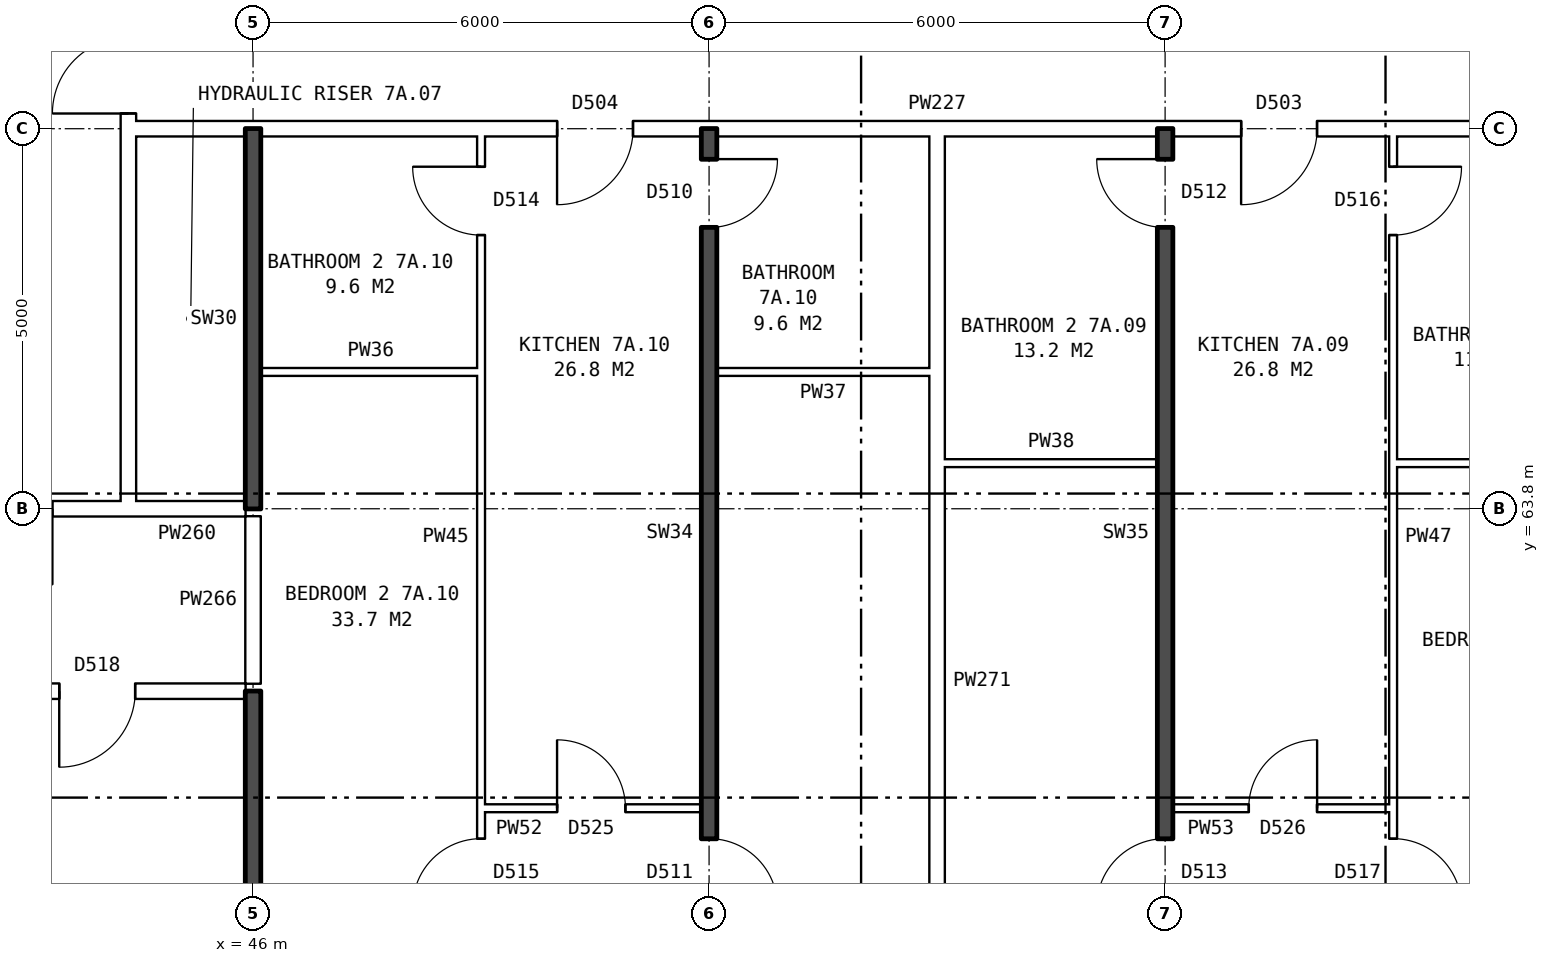
"""IFC4 building model, lengths in metres.
Left out: names, types, materials, properties, quantities, classifications, styles, units other than length and angle.
Written with IfcOpenShell. Run it as: python <this file> out.ifc"""

import sys

from ifc_helpers import new_model, si_unit, direction, frame, frame_2d, origin, place, context, subcontext, project, spatial, rectangle, extrude, element, fill, save


model = new_model("IFC4")
c1 = context("Model", 3, precision=1e-05, world=origin(), true_north=direction((0.0, 1.0)))
c2 = subcontext(c1, "Body", "Model", "MODEL_VIEW")
j1 = project(units=[si_unit("LENGTHUNIT", "METRE"), si_unit("PLANEANGLEUNIT", "RADIAN")], contexts=[c1])
p1 = place(None, origin())
s1 = spatial("IfcSite", under=j1, at=p1, CompositionType="ELEMENT")
p2 = place(p1, origin())
s2 = spatial("IfcBuilding", under=s1, at=p2, CompositionType="ELEMENT")
p3 = place(p2, frame((0.0, 0.0, 28.8)))
s3 = spatial("IfcBuildingStorey", under=s2, at=p3, CompositionType="ELEMENT", Elevation=28.8)
p4 = place(p3, frame((44.36, 63.9, 0.0), z_axis=(0.0, 0.0, 1.0), x_axis=(0.0, 1.0, 0.0)))
e1 = element("IfcWall", 1, at=p4, inside=s3, PredefinedType="PARTITIONING", context=c2, shape_type="SweptSolid", body=[
    extrude(rectangle(XDim=12.2, YDim=0.2, at=frame_2d((6.1, 0.0))), origin(), (0.0, 0.0, 1.0), 2.85),
])
p5 = place(p4, frame((5.1, 0.0, 0.0)))
e2 = element("IfcOpeningElement", 2, at=p5, cuts=e1, PredefinedType="OPENING", context=c2, shape_type="SweptSolid", body=[
    extrude(rectangle(XDim=2.0, YDim=2.1, at=frame_2d((1.0, 1.05))), frame((0.0, 0.11, 0.0), z_axis=(0.0, -1.0, 0.0), x_axis=(1.0, 0.0, 0.0)), (0.0, 0.0, 1.0), 0.22),
])
p6 = place(p3, frame((49.0, 59.86, 0.0), z_axis=(0.0, 0.0, 1.0), x_axis=(1.0, 0.0, 0.0)))
e3 = element("IfcWall", 3, at=p6, inside=s3, PredefinedType="PARTITIONING", context=c2, shape_type="SweptSolid", body=[
    extrude(rectangle(XDim=2.9, YDim=0.1, at=frame_2d((1.45, 0.0))), origin(), (0.0, 0.0, 1.0), 2.85),
])
p7 = place(p6, frame((1.0, 0.0, 0.0)))
e4 = element("IfcOpeningElement", 4, at=p7, cuts=e3, PredefinedType="OPENING", context=c2, shape_type="SweptSolid", body=[
    extrude(rectangle(XDim=0.9, YDim=2.1, at=frame_2d((0.45, 1.05))), frame((0.0, 0.06, 0.0), z_axis=(0.0, -1.0, 0.0), x_axis=(1.0, 0.0, 0.0)), (0.0, 0.0, 1.0), 0.12),
])
p8 = place(p3, frame((58.1, 59.86, 0.0), z_axis=(0.0, 0.0, 1.0), x_axis=(1.0, 0.0, 0.0)))
e5 = element("IfcWall", 5, at=p8, inside=s3, PredefinedType="PARTITIONING", context=c2, shape_type="SweptSolid", body=[
    extrude(rectangle(XDim=2.9, YDim=0.1, at=frame_2d((1.45, 0.0))), origin(), (0.0, 0.0, 1.0), 2.85),
])
p9 = place(p8, frame((1.0, 0.0, 0.0)))
e6 = element("IfcOpeningElement", 6, at=p9, cuts=e5, PredefinedType="OPENING", context=c2, shape_type="SweptSolid", body=[
    extrude(rectangle(XDim=0.9, YDim=2.1, at=frame_2d((0.45, 1.05))), frame((0.0, 0.06, 0.0), z_axis=(0.0, -1.0, 0.0), x_axis=(1.0, 0.0, 0.0)), (0.0, 0.0, 1.0), 0.12),
])
p10 = place(p3, frame((20.11, 61.4, 0.0), z_axis=(0.0, 0.0, 1.0), x_axis=(1.0, 0.0, 0.0)))
e7 = element("IfcWall", 7, at=p10, inside=s3, PredefinedType="PARTITIONING", context=c2, shape_type="SweptSolid", body=[
    extrude(rectangle(XDim=25.79, YDim=0.2, at=frame_2d((12.895, 0.0))), origin(), (0.0, 0.0, 1.0), 2.85),
])
p11 = place(p10, frame((23.34, 0.0, 0.0)))
e8 = element("IfcOpeningElement", 8, at=p11, cuts=e7, PredefinedType="OPENING", context=c2, shape_type="SweptSolid", body=[
    extrude(rectangle(XDim=1.0, YDim=2.1, at=frame_2d((0.5, 1.05))), frame((0.0, 0.11, 0.0), z_axis=(0.0, -1.0, 0.0), x_axis=(1.0, 0.0, 0.0)), (0.0, 0.0, 1.0), 0.22),
])
p12 = place(p10, frame((17.39, 0.0, 0.0)))
e9 = element("IfcOpeningElement", 9, at=p12, cuts=e7, PredefinedType="OPENING", context=c2, shape_type="SweptSolid", body=[
    extrude(rectangle(XDim=1.0, YDim=2.1, at=frame_2d((0.5, 1.05))), frame((0.0, 0.11, 0.0), z_axis=(0.0, -1.0, 0.0), x_axis=(1.0, 0.0, 0.0)), (0.0, 0.0, 1.0), 0.22),
])
p13 = place(p10, frame((11.39, 0.0, 0.0)))
e10 = element("IfcOpeningElement", 10, at=p13, cuts=e7, PredefinedType="OPENING", context=c2, shape_type="SweptSolid", body=[
    extrude(rectangle(XDim=1.0, YDim=2.1, at=frame_2d((0.5, 1.05))), frame((0.0, 0.11, 0.0), z_axis=(0.0, -1.0, 0.0), x_axis=(1.0, 0.0, 0.0)), (0.0, 0.0, 1.0), 0.22),
])
p14 = place(p10, frame((2.245, 0.0, 0.0)))
e11 = element("IfcOpeningElement", 11, at=p14, cuts=e7, PredefinedType="OPENING", context=c2, shape_type="SweptSolid", body=[
    extrude(rectangle(XDim=1.0, YDim=2.1, at=frame_2d((0.5, 1.05))), frame((0.0, 0.11, 0.0), z_axis=(0.0, -1.0, 0.0), x_axis=(1.0, 0.0, 0.0)), (0.0, 0.0, 1.0), 0.22),
])
p15 = place(p3, frame((41.36, 63.8, 0.0), z_axis=(0.0, 0.0, 1.0), x_axis=(1.0, 0.0, 0.0)))
e12 = element("IfcWall", 12, at=p15, inside=s3, PredefinedType="PARTITIONING", context=c2, shape_type="SweptSolid", body=[
    extrude(rectangle(XDim=3.0, YDim=0.2, at=frame_2d((1.5, 0.0))), origin(), (0.0, 0.0, 1.0), 2.85),
])
p16 = place(p15, frame((1.0, 0.0, 0.0)))
e13 = element("IfcOpeningElement", 13, at=p16, cuts=e12, PredefinedType="OPENING", context=c2, shape_type="SweptSolid", body=[
    extrude(rectangle(XDim=1.0, YDim=2.1, at=frame_2d((0.5, 1.05))), frame((0.0, 0.11, 0.0), z_axis=(0.0, -1.0, 0.0), x_axis=(1.0, 0.0, 0.0)), (0.0, 0.0, 1.0), 0.22),
])
p17 = place(p3, frame((44.36, 63.8, 0.0), z_axis=(0.0, 0.0, 1.0), x_axis=(1.0, 0.0, 0.0)))
e14 = element("IfcWall", 14, at=p17, inside=s3, PredefinedType="PARTITIONING", context=c2, shape_type="SweptSolid", body=[
    extrude(rectangle(XDim=1.54, YDim=0.2, at=frame_2d((0.77, 0.0))), origin(), (0.0, 0.0, 1.0), 2.85),
])
p18 = place(p3, frame((55.1, 64.4, 0.0), z_axis=(0.0, 0.0, 1.0), x_axis=(1.0, 0.0, 0.0)))
e15 = element("IfcWall", 15, at=p18, inside=s3, PredefinedType="PARTITIONING", context=c2, shape_type="SweptSolid", body=[
    extrude(rectangle(XDim=2.8, YDim=0.1, at=frame_2d((1.4, 0.0))), origin(), (0.0, 0.0, 1.0), 2.85),
])
p19 = place(p3, frame((61.0, 64.4, 0.0), z_axis=(0.0, 0.0, 1.0), x_axis=(1.0, 0.0, 0.0)))
e16 = element("IfcWall", 16, at=p19, inside=s3, PredefinedType="PARTITIONING", context=c2, shape_type="SweptSolid", body=[
    extrude(rectangle(XDim=2.64, YDim=0.1, at=frame_2d((1.32, 0.0))), origin(), (0.0, 0.0, 1.0), 2.85),
])
p20 = place(p3, frame((46.1, 65.6, 0.0), z_axis=(0.0, 0.0, 1.0), x_axis=(1.0, 0.0, 0.0)))
e17 = element("IfcWall", 17, at=p20, inside=s3, PredefinedType="PARTITIONING", context=c2, shape_type="SweptSolid", body=[
    extrude(rectangle(XDim=2.9, YDim=0.1, at=frame_2d((1.45, 0.0))), origin(), (0.0, 0.0, 1.0), 2.85),
])
p21 = place(p3, frame((52.1, 65.6, 0.0), z_axis=(0.0, 0.0, 1.0), x_axis=(1.0, 0.0, 0.0)))
e18 = element("IfcWall", 18, at=p21, inside=s3, PredefinedType="PARTITIONING", context=c2, shape_type="SweptSolid", body=[
    extrude(rectangle(XDim=2.8, YDim=0.1, at=frame_2d((1.4, 0.0))), origin(), (0.0, 0.0, 1.0), 2.85),
])
p22 = place(p3, frame((44.36, 68.8, 0.0), z_axis=(0.0, 0.0, 1.0), x_axis=(1.0, 0.0, 0.0)))
e19 = element("IfcWall", 19, at=p22, inside=s3, PredefinedType="PARTITIONING", context=c2, shape_type="SweptSolid", body=[
    extrude(rectangle(XDim=19.28, YDim=0.2, at=frame_2d((9.64, 0.0))), origin(), (0.0, 0.0, 1.0), 2.85),
])
p23 = place(p22, frame((14.64, 0.0, 0.0)))
e20 = element("IfcOpeningElement", 20, at=p23, cuts=e19, PredefinedType="OPENING", context=c2, shape_type="SweptSolid", body=[
    extrude(rectangle(XDim=1.0, YDim=2.1, at=frame_2d((0.5, 1.05))), frame((0.0, 0.11, 0.0), z_axis=(0.0, -1.0, 0.0), x_axis=(1.0, 0.0, 0.0)), (0.0, 0.0, 1.0), 0.22),
])
p24 = place(p22, frame((5.64, 0.0, 0.0)))
e21 = element("IfcOpeningElement", 21, at=p24, cuts=e19, PredefinedType="OPENING", context=c2, shape_type="SweptSolid", body=[
    extrude(rectangle(XDim=1.0, YDim=2.1, at=frame_2d((0.5, 1.05))), frame((0.0, 0.11, 0.0), z_axis=(0.0, -1.0, 0.0), x_axis=(1.0, 0.0, 0.0)), (0.0, 0.0, 1.0), 0.22),
])
p25 = place(p3, frame((46.0, 54.36, 0.0), z_axis=(0.0, 0.0, 1.0), x_axis=(0.0, 1.0, 0.0)))
e22 = element("IfcWall", 22, at=p25, inside=s3, PredefinedType="SOLIDWALL", context=c2, shape_type="SweptSolid", body=[
    extrude(rectangle(XDim=7.04, YDim=0.2, at=frame_2d((3.52, 0.0))), origin(), (0.0, 0.0, 1.0), 2.85),
])
p26 = place(p3, frame((46.0, 61.5, 0.0), z_axis=(0.0, 0.0, 1.0), x_axis=(0.0, 1.0, 0.0)))
e23 = element("IfcWall", 23, at=p26, inside=s3, PredefinedType="PARTITIONING", context=c2, shape_type="SweptSolid", body=[
    extrude(rectangle(XDim=2.2, YDim=0.2, at=frame_2d((1.1, 0.0))), origin(), (0.0, 0.0, 1.0), 2.85),
])
p27 = place(p3, frame((46.0, 63.8, 0.0), z_axis=(0.0, 0.0, 1.0), x_axis=(0.0, 1.0, 0.0)))
e24 = element("IfcWall", 24, at=p27, inside=s3, PredefinedType="SOLIDWALL", context=c2, shape_type="SweptSolid", body=[
    extrude(rectangle(XDim=5.0, YDim=0.2, at=frame_2d((2.5, 0.0))), origin(), (0.0, 0.0, 1.0), 2.85),
])
p28 = place(p3, frame((49.0, 54.36, 0.0), z_axis=(0.0, 0.0, 1.0), x_axis=(0.0, 1.0, 0.0)))
e25 = element("IfcWall", 25, at=p28, inside=s3, PredefinedType="PARTITIONING", context=c2, shape_type="SweptSolid", body=[
    extrude(rectangle(XDim=14.34, YDim=0.1, at=frame_2d((7.17, 0.0))), origin(), (0.0, 0.0, 1.0), 2.85),
])
p29 = place(p28, frame((4.2, 0.0, 0.0)))
e26 = element("IfcOpeningElement", 26, at=p29, cuts=e25, PredefinedType="OPENING", context=c2, shape_type="SweptSolid", body=[
    extrude(rectangle(XDim=0.9, YDim=2.1, at=frame_2d((0.45, 1.05))), frame((0.0, 0.06, 0.0), z_axis=(0.0, -1.0, 0.0), x_axis=(1.0, 0.0, 0.0)), (0.0, 0.0, 1.0), 0.12),
])
p30 = place(p28, frame((13.04, 0.0, 0.0)))
e27 = element("IfcOpeningElement", 27, at=p30, cuts=e25, PredefinedType="OPENING", context=c2, shape_type="SweptSolid", body=[
    extrude(rectangle(XDim=0.9, YDim=2.1, at=frame_2d((0.45, 1.05))), frame((0.0, 0.06, 0.0), z_axis=(0.0, -1.0, 0.0), x_axis=(1.0, 0.0, 0.0)), (0.0, 0.0, 1.0), 0.12),
])
p31 = place(p3, frame((52.0, 54.36, 0.0), z_axis=(0.0, 0.0, 1.0), x_axis=(0.0, 1.0, 0.0)))
e28 = element("IfcWall", 28, at=p31, inside=s3, PredefinedType="SOLIDWALL", context=c2, shape_type="SweptSolid", body=[
    extrude(rectangle(XDim=14.44, YDim=0.2, at=frame_2d((7.22, 0.0))), origin(), (0.0, 0.0, 1.0), 2.85),
])
p32 = place(p31, frame((4.2, 0.0, 0.0)))
e29 = element("IfcOpeningElement", 29, at=p32, cuts=e28, PredefinedType="OPENING", context=c2, shape_type="SweptSolid", body=[
    extrude(rectangle(XDim=0.9, YDim=2.1, at=frame_2d((0.45, 1.05))), frame((0.0, 0.11, 0.0), z_axis=(0.0, -1.0, 0.0), x_axis=(1.0, 0.0, 0.0)), (0.0, 0.0, 1.0), 0.22),
])
p33 = place(p31, frame((13.14, 0.0, 0.0)))
e30 = element("IfcOpeningElement", 30, at=p33, cuts=e28, PredefinedType="OPENING", context=c2, shape_type="SweptSolid", body=[
    extrude(rectangle(XDim=0.9, YDim=2.1, at=frame_2d((0.45, 1.05))), frame((0.0, 0.11, 0.0), z_axis=(0.0, -1.0, 0.0), x_axis=(1.0, 0.0, 0.0)), (0.0, 0.0, 1.0), 0.22),
])
p34 = place(p3, frame((55.0, 54.36, 0.0), z_axis=(0.0, 0.0, 1.0), x_axis=(0.0, 1.0, 0.0)))
e31 = element("IfcWall", 31, at=p34, inside=s3, PredefinedType="PARTITIONING", context=c2, shape_type="SweptSolid", body=[
    extrude(rectangle(XDim=14.34, YDim=0.2, at=frame_2d((7.17, 0.0))), origin(), (0.0, 0.0, 1.0), 2.85),
])
p35 = place(p3, frame((58.0, 54.36, 0.0), z_axis=(0.0, 0.0, 1.0), x_axis=(0.0, 1.0, 0.0)))
e32 = element("IfcWall", 32, at=p35, inside=s3, PredefinedType="SOLIDWALL", context=c2, shape_type="SweptSolid", body=[
    extrude(rectangle(XDim=14.44, YDim=0.2, at=frame_2d((7.22, 0.0))), origin(), (0.0, 0.0, 1.0), 2.85),
])
p36 = place(p35, frame((4.2, 0.0, 0.0)))
e33 = element("IfcOpeningElement", 33, at=p36, cuts=e32, PredefinedType="OPENING", context=c2, shape_type="SweptSolid", body=[
    extrude(rectangle(XDim=0.9, YDim=2.1, at=frame_2d((0.45, 1.05))), frame((0.0, 0.11, 0.0), z_axis=(0.0, -1.0, 0.0), x_axis=(1.0, 0.0, 0.0)), (0.0, 0.0, 1.0), 0.22),
])
p37 = place(p35, frame((13.14, 0.0, 0.0)))
e34 = element("IfcOpeningElement", 34, at=p37, cuts=e32, PredefinedType="OPENING", context=c2, shape_type="SweptSolid", body=[
    extrude(rectangle(XDim=0.9, YDim=2.1, at=frame_2d((0.45, 1.05))), frame((0.0, 0.11, 0.0), z_axis=(0.0, -1.0, 0.0), x_axis=(1.0, 0.0, 0.0)), (0.0, 0.0, 1.0), 0.22),
])
p38 = place(p3, frame((61.0, 54.36, 0.0), z_axis=(0.0, 0.0, 1.0), x_axis=(0.0, 1.0, 0.0)))
e35 = element("IfcWall", 35, at=p38, inside=s3, PredefinedType="PARTITIONING", context=c2, shape_type="SweptSolid", body=[
    extrude(rectangle(XDim=14.34, YDim=0.1, at=frame_2d((7.17, 0.0))), origin(), (0.0, 0.0, 1.0), 2.85),
])
p39 = place(p38, frame((4.2, 0.0, 0.0)))
e36 = element("IfcOpeningElement", 36, at=p39, cuts=e35, PredefinedType="OPENING", context=c2, shape_type="SweptSolid", body=[
    extrude(rectangle(XDim=0.9, YDim=2.1, at=frame_2d((0.45, 1.05))), frame((0.0, 0.06, 0.0), z_axis=(0.0, -1.0, 0.0), x_axis=(1.0, 0.0, 0.0)), (0.0, 0.0, 1.0), 0.12),
])
p40 = place(p38, frame((13.04, 0.0, 0.0)))
e37 = element("IfcOpeningElement", 37, at=p40, cuts=e35, PredefinedType="OPENING", context=c2, shape_type="SweptSolid", body=[
    extrude(rectangle(XDim=0.9, YDim=2.1, at=frame_2d((0.45, 1.05))), frame((0.0, 0.06, 0.0), z_axis=(0.0, -1.0, 0.0), x_axis=(1.0, 0.0, 0.0)), (0.0, 0.0, 1.0), 0.12),
])
p41 = place(p5, origin())
e38 = element("IfcDoor", 38, at=p41, inside=s3, OperationType="DOUBLE_DOOR_SINGLE_SWING", PredefinedType="DOOR", context=c2, shape_type="SweptSolid", body=[
    extrude(rectangle(XDim=2.0, YDim=2.1, at=frame_2d((1.0, 1.05))), frame((0.0, 0.025, 0.0), z_axis=(0.0, -1.0, 0.0), x_axis=(1.0, 0.0, 0.0)), (0.0, 0.0, 1.0), 0.05),
])
fill(e2, e38)
p42 = place(p39, frame((0.9, 0.0, 0.0), z_axis=(0.0, 0.0, 1.0), x_axis=(-1.0, 0.0, 0.0)))
e39 = element("IfcDoor", 39, at=p42, inside=s3, OperationType="SINGLE_SWING_RIGHT", PredefinedType="DOOR", context=c2, shape_type="SweptSolid", body=[
    extrude(rectangle(XDim=0.9, YDim=2.1, at=frame_2d((0.45, 1.05))), frame((0.0, 0.025, 0.0), z_axis=(0.0, -1.0, 0.0), x_axis=(1.0, 0.0, 0.0)), (0.0, 0.0, 1.0), 0.05),
])
fill(e36, e39)
p43 = place(p36, origin())
e40 = element("IfcDoor", 40, at=p43, inside=s3, OperationType="SINGLE_SWING_LEFT", PredefinedType="DOOR", context=c2, shape_type="SweptSolid", body=[
    extrude(rectangle(XDim=0.9, YDim=2.1, at=frame_2d((0.45, 1.05))), frame((0.0, 0.025, 0.0), z_axis=(0.0, -1.0, 0.0), x_axis=(1.0, 0.0, 0.0)), (0.0, 0.0, 1.0), 0.05),
])
fill(e33, e40)
p44 = place(p23, frame((1.0, 0.0, 0.0), z_axis=(0.0, 0.0, 1.0), x_axis=(-1.0, 0.0, 0.0)))
e41 = element("IfcDoor", 41, at=p44, inside=s3, OperationType="SINGLE_SWING_RIGHT", PredefinedType="DOOR", context=c2, shape_type="SweptSolid", body=[
    extrude(rectangle(XDim=1.0, YDim=2.1, at=frame_2d((0.5, 1.05))), frame((0.0, 0.025, 0.0), z_axis=(0.0, -1.0, 0.0), x_axis=(1.0, 0.0, 0.0)), (0.0, 0.0, 1.0), 0.05),
])
fill(e20, e41)
p45 = place(p9, origin())
e42 = element("IfcDoor", 42, at=p45, inside=s3, OperationType="SINGLE_SWING_RIGHT", PredefinedType="DOOR", context=c2, shape_type="SweptSolid", body=[
    extrude(rectangle(XDim=0.9, YDim=2.1, at=frame_2d((0.45, 1.05))), frame((0.0, 0.025, 0.0), z_axis=(0.0, -1.0, 0.0), x_axis=(1.0, 0.0, 0.0)), (0.0, 0.0, 1.0), 0.05),
])
fill(e6, e42)
p46 = place(p40, frame((0.9, 0.0, 0.0), z_axis=(0.0, 0.0, 1.0), x_axis=(-1.0, 0.0, 0.0)))
e43 = element("IfcDoor", 43, at=p46, inside=s3, OperationType="SINGLE_SWING_LEFT", PredefinedType="DOOR", context=c2, shape_type="SweptSolid", body=[
    extrude(rectangle(XDim=0.9, YDim=2.1, at=frame_2d((0.45, 1.05))), frame((0.0, 0.025, 0.0), z_axis=(0.0, -1.0, 0.0), x_axis=(1.0, 0.0, 0.0)), (0.0, 0.0, 1.0), 0.05),
])
fill(e37, e43)
p47 = place(p37, origin())
e44 = element("IfcDoor", 44, at=p47, inside=s3, OperationType="SINGLE_SWING_RIGHT", PredefinedType="DOOR", context=c2, shape_type="SweptSolid", body=[
    extrude(rectangle(XDim=0.9, YDim=2.1, at=frame_2d((0.45, 1.05))), frame((0.0, 0.025, 0.0), z_axis=(0.0, -1.0, 0.0), x_axis=(1.0, 0.0, 0.0)), (0.0, 0.0, 1.0), 0.05),
])
fill(e34, e44)
p48 = place(p32, frame((0.9, 0.0, 0.0), z_axis=(0.0, 0.0, 1.0), x_axis=(-1.0, 0.0, 0.0)))
e45 = element("IfcDoor", 45, at=p48, inside=s3, OperationType="SINGLE_SWING_RIGHT", PredefinedType="DOOR", context=c2, shape_type="SweptSolid", body=[
    extrude(rectangle(XDim=0.9, YDim=2.1, at=frame_2d((0.45, 1.05))), frame((0.0, 0.025, 0.0), z_axis=(0.0, -1.0, 0.0), x_axis=(1.0, 0.0, 0.0)), (0.0, 0.0, 1.0), 0.05),
])
fill(e29, e45)
p49 = place(p29, origin())
e46 = element("IfcDoor", 46, at=p49, inside=s3, OperationType="SINGLE_SWING_LEFT", PredefinedType="DOOR", context=c2, shape_type="SweptSolid", body=[
    extrude(rectangle(XDim=0.9, YDim=2.1, at=frame_2d((0.45, 1.05))), frame((0.0, 0.025, 0.0), z_axis=(0.0, -1.0, 0.0), x_axis=(1.0, 0.0, 0.0)), (0.0, 0.0, 1.0), 0.05),
])
fill(e26, e46)
p50 = place(p24, frame((1.0, 0.0, 0.0), z_axis=(0.0, 0.0, 1.0), x_axis=(-1.0, 0.0, 0.0)))
e47 = element("IfcDoor", 47, at=p50, inside=s3, OperationType="SINGLE_SWING_RIGHT", PredefinedType="DOOR", context=c2, shape_type="SweptSolid", body=[
    extrude(rectangle(XDim=1.0, YDim=2.1, at=frame_2d((0.5, 1.05))), frame((0.0, 0.025, 0.0), z_axis=(0.0, -1.0, 0.0), x_axis=(1.0, 0.0, 0.0)), (0.0, 0.0, 1.0), 0.05),
])
fill(e21, e47)
p51 = place(p7, origin())
e48 = element("IfcDoor", 48, at=p51, inside=s3, OperationType="SINGLE_SWING_LEFT", PredefinedType="DOOR", context=c2, shape_type="SweptSolid", body=[
    extrude(rectangle(XDim=0.9, YDim=2.1, at=frame_2d((0.45, 1.05))), frame((0.0, 0.025, 0.0), z_axis=(0.0, -1.0, 0.0), x_axis=(1.0, 0.0, 0.0)), (0.0, 0.0, 1.0), 0.05),
])
fill(e4, e48)
p52 = place(p33, frame((0.9, 0.0, 0.0), z_axis=(0.0, 0.0, 1.0), x_axis=(-1.0, 0.0, 0.0)))
e49 = element("IfcDoor", 49, at=p52, inside=s3, OperationType="SINGLE_SWING_LEFT", PredefinedType="DOOR", context=c2, shape_type="SweptSolid", body=[
    extrude(rectangle(XDim=0.9, YDim=2.1, at=frame_2d((0.45, 1.05))), frame((0.0, 0.025, 0.0), z_axis=(0.0, -1.0, 0.0), x_axis=(1.0, 0.0, 0.0)), (0.0, 0.0, 1.0), 0.05),
])
fill(e30, e49)
p53 = place(p30, origin())
e50 = element("IfcDoor", 50, at=p53, inside=s3, OperationType="SINGLE_SWING_RIGHT", PredefinedType="DOOR", context=c2, shape_type="SweptSolid", body=[
    extrude(rectangle(XDim=0.9, YDim=2.1, at=frame_2d((0.45, 1.05))), frame((0.0, 0.025, 0.0), z_axis=(0.0, -1.0, 0.0), x_axis=(1.0, 0.0, 0.0)), (0.0, 0.0, 1.0), 0.05),
])
fill(e27, e50)
p54 = place(p11, frame((1.0, 0.0, 0.0), z_axis=(0.0, 0.0, 1.0), x_axis=(-1.0, 0.0, 0.0)))
e51 = element("IfcDoor", 51, at=p54, inside=s3, OperationType="SINGLE_SWING_RIGHT", PredefinedType="DOOR", context=c2, shape_type="SweptSolid", body=[
    extrude(rectangle(XDim=1.0, YDim=2.1, at=frame_2d((0.5, 1.05))), frame((0.0, 0.025, 0.0), z_axis=(0.0, -1.0, 0.0), x_axis=(1.0, 0.0, 0.0)), (0.0, 0.0, 1.0), 0.05),
])
fill(e8, e51)
save(model, sys.argv[1])
